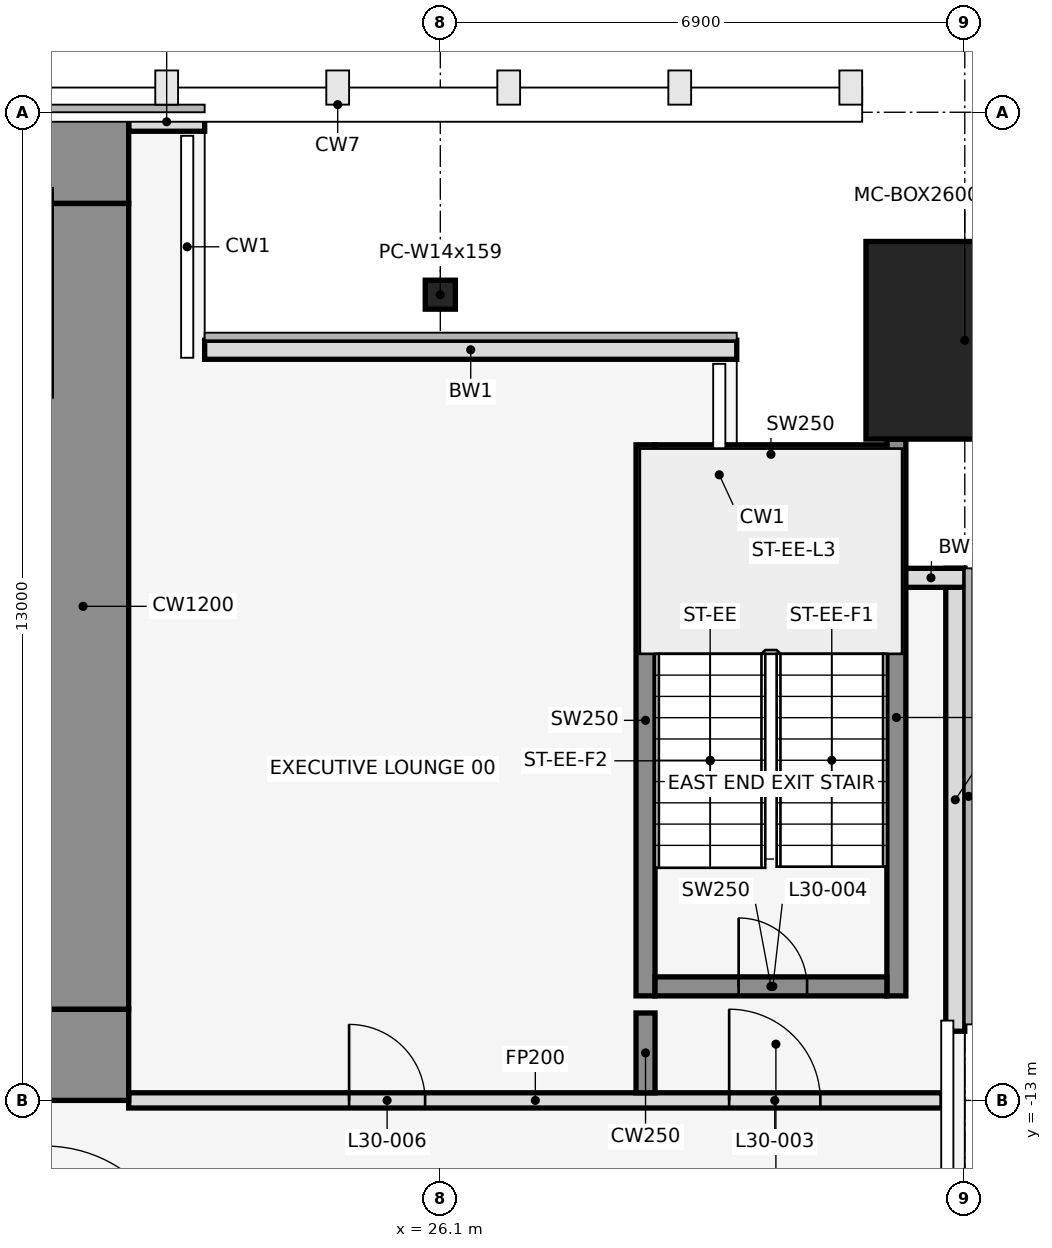
"""IFC4 building model, lengths in metres.
Left out: names, types, materials, properties, quantities, classifications, styles, units other than length and angle.
Written with IfcOpenShell. Run it as: python <this file> out.ifc"""

import sys

from ifc_helpers import new_model, si_unit, direction, frame, frame_2d, origin, origin_2d, place, context, subcontext, project, spatial, rectangle, hollow_rectangle, i_section, extrude, element, fill, save


model = new_model("IFC4")
c1 = context("Model", 3, precision=1e-05, world=origin(), true_north=direction((0.0, 1.0)))
c2 = subcontext(c1, "Body", "Model", "MODEL_VIEW")
j1 = project(units=[si_unit("LENGTHUNIT", "METRE"), si_unit("PLANEANGLEUNIT", "RADIAN")], contexts=[c1])
p1 = place(None, origin())
s1 = spatial("IfcSite", under=j1, at=p1, CompositionType="ELEMENT")
p2 = place(p1, origin())
s2 = spatial("IfcBuilding", under=s1, at=p2, CompositionType="ELEMENT")
p3 = place(p2, frame((0.0, 0.0, 140.4)))
s3 = spatial("IfcBuildingStorey", under=s2, at=p3, CompositionType="ELEMENT", Elevation=140.4)
p4 = place(p3, frame((26.1, -2.4, 0.0), z_axis=(0.0, 0.0, 1.0), x_axis=(1.0, 0.0, 0.0)))
e1 = element("IfcColumn", 1, at=p4, inside=s3, PredefinedType="COLUMN", context=c2, shape_type="SweptSolid", body=[
    extrude(i_section(OverallWidth=0.396, OverallDepth=0.381, WebThickness=0.019, FlangeThickness=0.03, at=origin_2d()), origin(), (0.0, 0.0, 1.0), 4.1),
])
p5 = place(p3, frame((33.0, -3.0, 0.0), z_axis=(0.0, 0.0, 1.0), x_axis=(1.0, 0.0, 0.0)))
e2 = element("IfcColumn", 2, at=p5, inside=s3, PredefinedType="COLUMN", context=c2, shape_type="SweptSolid", body=[
    extrude(hollow_rectangle(XDim=2.6, YDim=2.6, WallThickness=0.08, at=origin_2d()), origin(), (0.0, 0.0, 1.0), 4.1),
])
p6 = place(p3, frame((32.875, -12.09, 0.0), z_axis=(0.0, 0.0, 1.0), x_axis=(0.0, 1.0, 0.0)))
e3 = element("IfcWall", 3, at=p6, inside=s3, PredefinedType="STANDARD", context=c2, shape_type="SweptSolid", body=[
    extrude(rectangle(XDim=6.09, YDim=0.25, at=frame_2d((3.045, 0.0))), origin(), (0.0, 0.0, 1.0), 3.95),
])
p7 = place(p3, frame((33.0, -6.125, 0.0), z_axis=(0.0, 0.0, 1.0), x_axis=(-1.0, 0.0, 0.0)))
e4 = element("IfcWall", 4, at=p7, inside=s3, PredefinedType="STANDARD", context=c2, shape_type="SweptSolid", body=[
    extrude(rectangle(XDim=0.89, YDim=0.25, at=frame_2d((0.445, 0.0))), origin(), (0.0, 0.0, 1.0), 3.95),
])
p8 = place(p3, frame((30.0, -3.125, 0.0), z_axis=(0.0, 0.0, 1.0), x_axis=(-1.0, 0.0, 0.0)))
e5 = element("IfcWall", 5, at=p8, inside=s3, PredefinedType="STANDARD", context=c2, shape_type="SweptSolid", body=[
    extrude(rectangle(XDim=7.0, YDim=0.25, at=frame_2d((3.5, 0.0))), origin(), (0.0, 0.0, 1.0), 3.95),
])
p9 = place(p3, frame((23.0, -0.125, 0.0), z_axis=(0.0, 0.0, 1.0), x_axis=(-1.0, 0.0, 0.0)))
e6 = element("IfcWall", 6, at=p9, inside=s3, PredefinedType="STANDARD", context=c2, shape_type="SweptSolid", body=[
    extrude(rectangle(XDim=1.0, YDim=0.25, at=frame_2d((0.5, 0.0))), origin(), (0.0, 0.0, 1.0), 3.95),
])
p10 = place(p3, frame((28.8, -11.625, 0.0), z_axis=(0.0, 0.0, 1.0), x_axis=(0.0, 1.0, 0.0)))
e7 = element("IfcWall", 7, at=p10, inside=s3, PredefinedType="SHEAR", context=c2, shape_type="SweptSolid", body=[
    extrude(rectangle(XDim=7.25, YDim=0.25, at=frame_2d((3.625, 0.0))), origin(), (0.0, 0.0, 1.0), 4.1),
])
p11 = place(p3, frame((32.1, -11.625, 0.0), z_axis=(0.0, 0.0, 1.0), x_axis=(0.0, 1.0, 0.0)))
e8 = element("IfcWall", 8, at=p11, inside=s3, PredefinedType="SHEAR", context=c2, shape_type="SweptSolid", body=[
    extrude(rectangle(XDim=7.325, YDim=0.25, at=frame_2d((3.663, 0.0))), origin(), (0.0, 0.0, 1.0), 4.1),
])
p12 = place(p3, frame((28.925, -11.5, 0.0), z_axis=(0.0, 0.0, 1.0), x_axis=(1.0, 0.0, 0.0)))
e9 = element("IfcWall", 9, at=p12, inside=s3, PredefinedType="SHEAR", context=c2, shape_type="SweptSolid", body=[
    extrude(rectangle(XDim=3.05, YDim=0.25, at=frame_2d((1.525, 0.0))), origin(), (0.0, 0.0, 1.0), 4.1),
])
p13 = place(p12, frame((1.1, 0.0, 0.0)))
e10 = element("IfcOpeningElement", 10, at=p13, cuts=e9, PredefinedType="OPENING", context=c2, shape_type="SweptSolid", body=[
    extrude(rectangle(XDim=0.9, YDim=2.1, at=frame_2d((0.45, 1.05))), frame((0.0, 0.137, 0.0), z_axis=(0.0, -1.0, 0.0), x_axis=(1.0, 0.0, 0.0)), (0.0, 0.0, 1.0), 0.274),
])
p14 = place(p3, frame((28.925, -4.5, 0.0), z_axis=(0.0, 0.0, 1.0), x_axis=(1.0, 0.0, 0.0)))
e11 = element("IfcWall", 11, at=p14, inside=s3, PredefinedType="SHEAR", context=c2, shape_type="SweptSolid", body=[
    extrude(rectangle(XDim=3.05, YDim=0.25, at=frame_2d((1.525, 0.0))), origin(), (0.0, 0.0, 1.0), 4.1),
])
p15 = place(p3, frame((22.0, -13.0, 0.0), z_axis=(0.0, 0.0, 1.0), x_axis=(1.0, 0.0, 0.0)))
e12 = element("IfcWall", 12, at=p15, inside=s3, PredefinedType="PARTITIONING", context=c2, shape_type="SweptSolid", body=[
    extrude(rectangle(XDim=10.7, YDim=0.2, at=frame_2d((5.35, 0.0))), origin(), (0.0, 0.0, 1.0), 2.939),
])
p16 = place(p15, frame((7.9, 0.0, 0.0)))
e13 = element("IfcOpeningElement", 13, at=p16, cuts=e12, PredefinedType="OPENING", context=c2, shape_type="SweptSolid", body=[
    extrude(rectangle(XDim=1.2, YDim=2.1, at=frame_2d((0.6, 1.05))), frame((0.0, 0.112, 0.0), z_axis=(0.0, -1.0, 0.0), x_axis=(1.0, 0.0, 0.0)), (0.0, 0.0, 1.0), 0.224),
])
p17 = place(p15, frame((2.9, 0.0, 0.0)))
e14 = element("IfcOpeningElement", 14, at=p17, cuts=e12, PredefinedType="OPENING", context=c2, shape_type="SweptSolid", body=[
    extrude(rectangle(XDim=1.0, YDim=2.1, at=frame_2d((0.5, 1.05))), frame((0.0, 0.112, 0.0), z_axis=(0.0, -1.0, 0.0), x_axis=(1.0, 0.0, 0.0)), (0.0, 0.0, 1.0), 0.224),
])
p18 = place(p3, frame((28.8, -12.9, 0.0), z_axis=(0.0, 0.0, 1.0), x_axis=(0.0, 1.0, 0.0)))
e15 = element("IfcWall", 15, at=p18, inside=s3, PredefinedType="SHEAR", context=c2, shape_type="SweptSolid", body=[
    extrude(rectangle(XDim=1.05, YDim=0.25, at=frame_2d((0.525, 0.0))), origin(), (0.0, 0.0, 1.0), 4.1),
])
p19 = place(p3, frame((-22.0, -0.6, 0.0), z_axis=(0.0, 0.0, 1.0), x_axis=(1.0, 0.0, 0.0)))
e16 = element("IfcWall", 16, at=p19, inside=s3, PredefinedType="SHEAR", context=c2, shape_type="SweptSolid", body=[
    extrude(rectangle(XDim=44.0, YDim=1.2, at=frame_2d((22.0, 0.0))), origin(), (0.0, 0.0, 1.0), 4.1),
])
p20 = place(p19, frame((18.55, 0.0, 0.0)))
e17 = element("IfcOpeningElement", 17, at=p20, cuts=e16, PredefinedType="OPENING", context=c2, shape_type="SweptSolid", body=[
    extrude(rectangle(XDim=0.9, YDim=2.1, at=frame_2d((0.45, 1.05))), frame((0.0, 0.612, 0.0), z_axis=(0.0, -1.0, 0.0), x_axis=(1.0, 0.0, 0.0)), (0.0, 0.0, 1.0), 1.224),
])
p21 = place(p19, frame((24.55, 0.0, 0.0)))
e18 = element("IfcOpeningElement", 18, at=p21, cuts=e16, PredefinedType="OPENING", context=c2, shape_type="SweptSolid", body=[
    extrude(rectangle(XDim=0.9, YDim=2.1, at=frame_2d((0.45, 1.05))), frame((0.0, 0.612, 0.0), z_axis=(0.0, -1.0, 0.0), x_axis=(1.0, 0.0, 0.0)), (0.0, 0.0, 1.0), 1.224),
])
p22 = place(p3, frame((-22.0, -12.4, 0.0), z_axis=(0.0, 0.0, 1.0), x_axis=(1.0, 0.0, 0.0)))
e19 = element("IfcWall", 19, at=p22, inside=s3, PredefinedType="SHEAR", context=c2, shape_type="SweptSolid", body=[
    extrude(rectangle(XDim=44.0, YDim=1.2, at=frame_2d((22.0, 0.0))), origin(), (0.0, 0.0, 1.0), 4.1),
])
p23 = place(p22, frame((2.2, 0.0, 0.0)))
e20 = element("IfcOpeningElement", 20, at=p23, cuts=e19, PredefinedType="OPENING", context=c2, shape_type="SweptSolid", body=[
    extrude(rectangle(XDim=1.2, YDim=2.1, at=frame_2d((0.6, 1.05))), frame((0.0, 0.612, 0.0), z_axis=(0.0, -1.0, 0.0), x_axis=(1.0, 0.0, 0.0)), (0.0, 0.0, 1.0), 1.224),
])
p24 = place(p22, frame((21.4, 0.0, 0.0)))
e21 = element("IfcOpeningElement", 21, at=p24, cuts=e19, PredefinedType="OPENING", context=c2, shape_type="SweptSolid", body=[
    extrude(rectangle(XDim=1.2, YDim=2.1, at=frame_2d((0.6, 1.05))), frame((0.0, 0.612, 0.0), z_axis=(0.0, -1.0, 0.0), x_axis=(1.0, 0.0, 0.0)), (0.0, 0.0, 1.0), 1.224),
])
p25 = place(p22, frame((40.6, 0.0, 0.0)))
e22 = element("IfcOpeningElement", 22, at=p25, cuts=e19, PredefinedType="OPENING", context=c2, shape_type="SweptSolid", body=[
    extrude(rectangle(XDim=1.2, YDim=2.1, at=frame_2d((0.6, 1.05))), frame((0.0, 0.612, 0.0), z_axis=(0.0, -1.0, 0.0), x_axis=(1.0, 0.0, 0.0)), (0.0, 0.0, 1.0), 1.224),
])
p26 = place(p22, frame((16.0, 0.0, 0.0)))
e23 = element("IfcOpeningElement", 23, at=p26, cuts=e19, PredefinedType="OPENING", context=c2, shape_type="SweptSolid", body=[
    extrude(rectangle(XDim=1.8, YDim=2.1, at=frame_2d((0.9, 1.05))), frame((0.0, 0.612, 0.0), z_axis=(0.0, -1.0, 0.0), x_axis=(1.0, 0.0, 0.0)), (0.0, 0.0, 1.0), 1.224),
])
p27 = place(p22, frame((6.3, 0.0, 0.0)))
e24 = element("IfcOpeningElement", 24, at=p27, cuts=e19, PredefinedType="OPENING", context=c2, shape_type="SweptSolid", body=[
    extrude(rectangle(XDim=1.2, YDim=2.1, at=frame_2d((0.6, 1.05))), frame((0.0, 0.612, 0.0), z_axis=(0.0, -1.0, 0.0), x_axis=(1.0, 0.0, 0.0)), (0.0, 0.0, 1.0), 1.224),
])
p28 = place(p22, frame((26.2, 0.0, 0.0)))
e25 = element("IfcOpeningElement", 25, at=p28, cuts=e19, PredefinedType="OPENING", context=c2, shape_type="SweptSolid", body=[
    extrude(rectangle(XDim=1.8, YDim=2.1, at=frame_2d((0.9, 1.05))), frame((0.0, 0.612, 0.0), z_axis=(0.0, -1.0, 0.0), x_axis=(1.0, 0.0, 0.0)), (0.0, 0.0, 1.0), 1.224),
])
p29 = place(p22, frame((36.5, 0.0, 0.0)))
e26 = element("IfcOpeningElement", 26, at=p29, cuts=e19, PredefinedType="OPENING", context=c2, shape_type="SweptSolid", body=[
    extrude(rectangle(XDim=1.2, YDim=2.1, at=frame_2d((0.6, 1.05))), frame((0.0, 0.612, 0.0), z_axis=(0.0, -1.0, 0.0), x_axis=(1.0, 0.0, 0.0)), (0.0, 0.0, 1.0), 1.224),
])
p30 = place(p3, frame((21.4, -11.8, 0.0), z_axis=(0.0, 0.0, 1.0), x_axis=(0.0, 1.0, 0.0)))
e27 = element("IfcWall", 27, at=p30, inside=s3, PredefinedType="SHEAR", context=c2, shape_type="SweptSolid", body=[
    extrude(rectangle(XDim=10.6, YDim=1.2, at=frame_2d((5.3, 0.0))), origin(), (0.0, 0.0, 1.0), 4.1),
])
p31 = place(p16, origin())
e28 = element("IfcDoor", 28, at=p31, inside=s3, OperationType="SINGLE_SWING_RIGHT", PredefinedType="DOOR", context=c2, shape_type="SweptSolid", body=[
    extrude(rectangle(XDim=1.2, YDim=2.1, at=frame_2d((0.6, 1.05))), frame((0.0, 0.025, 0.0), z_axis=(0.0, -1.0, 0.0), x_axis=(1.0, 0.0, 0.0)), (0.0, 0.0, 1.0), 0.05),
])
fill(e13, e28)
p32 = place(p13, origin())
e29 = element("IfcDoor", 29, at=p32, inside=s3, OperationType="SINGLE_SWING_LEFT", PredefinedType="DOOR", context=c2, shape_type="SweptSolid", body=[
    extrude(rectangle(XDim=0.9, YDim=2.1, at=frame_2d((0.45, 1.05))), frame((0.0, 0.025, 0.0), z_axis=(0.0, -1.0, 0.0), x_axis=(1.0, 0.0, 0.0)), (0.0, 0.0, 1.0), 0.05),
])
fill(e10, e29)
p33 = place(p17, origin())
e30 = element("IfcDoor", 30, at=p33, inside=s3, OperationType="SINGLE_SWING_RIGHT", PredefinedType="DOOR", context=c2, shape_type="SweptSolid", body=[
    extrude(rectangle(XDim=1.0, YDim=2.1, at=frame_2d((0.5, 1.05))), frame((0.0, 0.025, 0.0), z_axis=(0.0, -1.0, 0.0), x_axis=(1.0, 0.0, 0.0)), (0.0, 0.0, 1.0), 0.05),
])
fill(e14, e30)
save(model, sys.argv[1])
